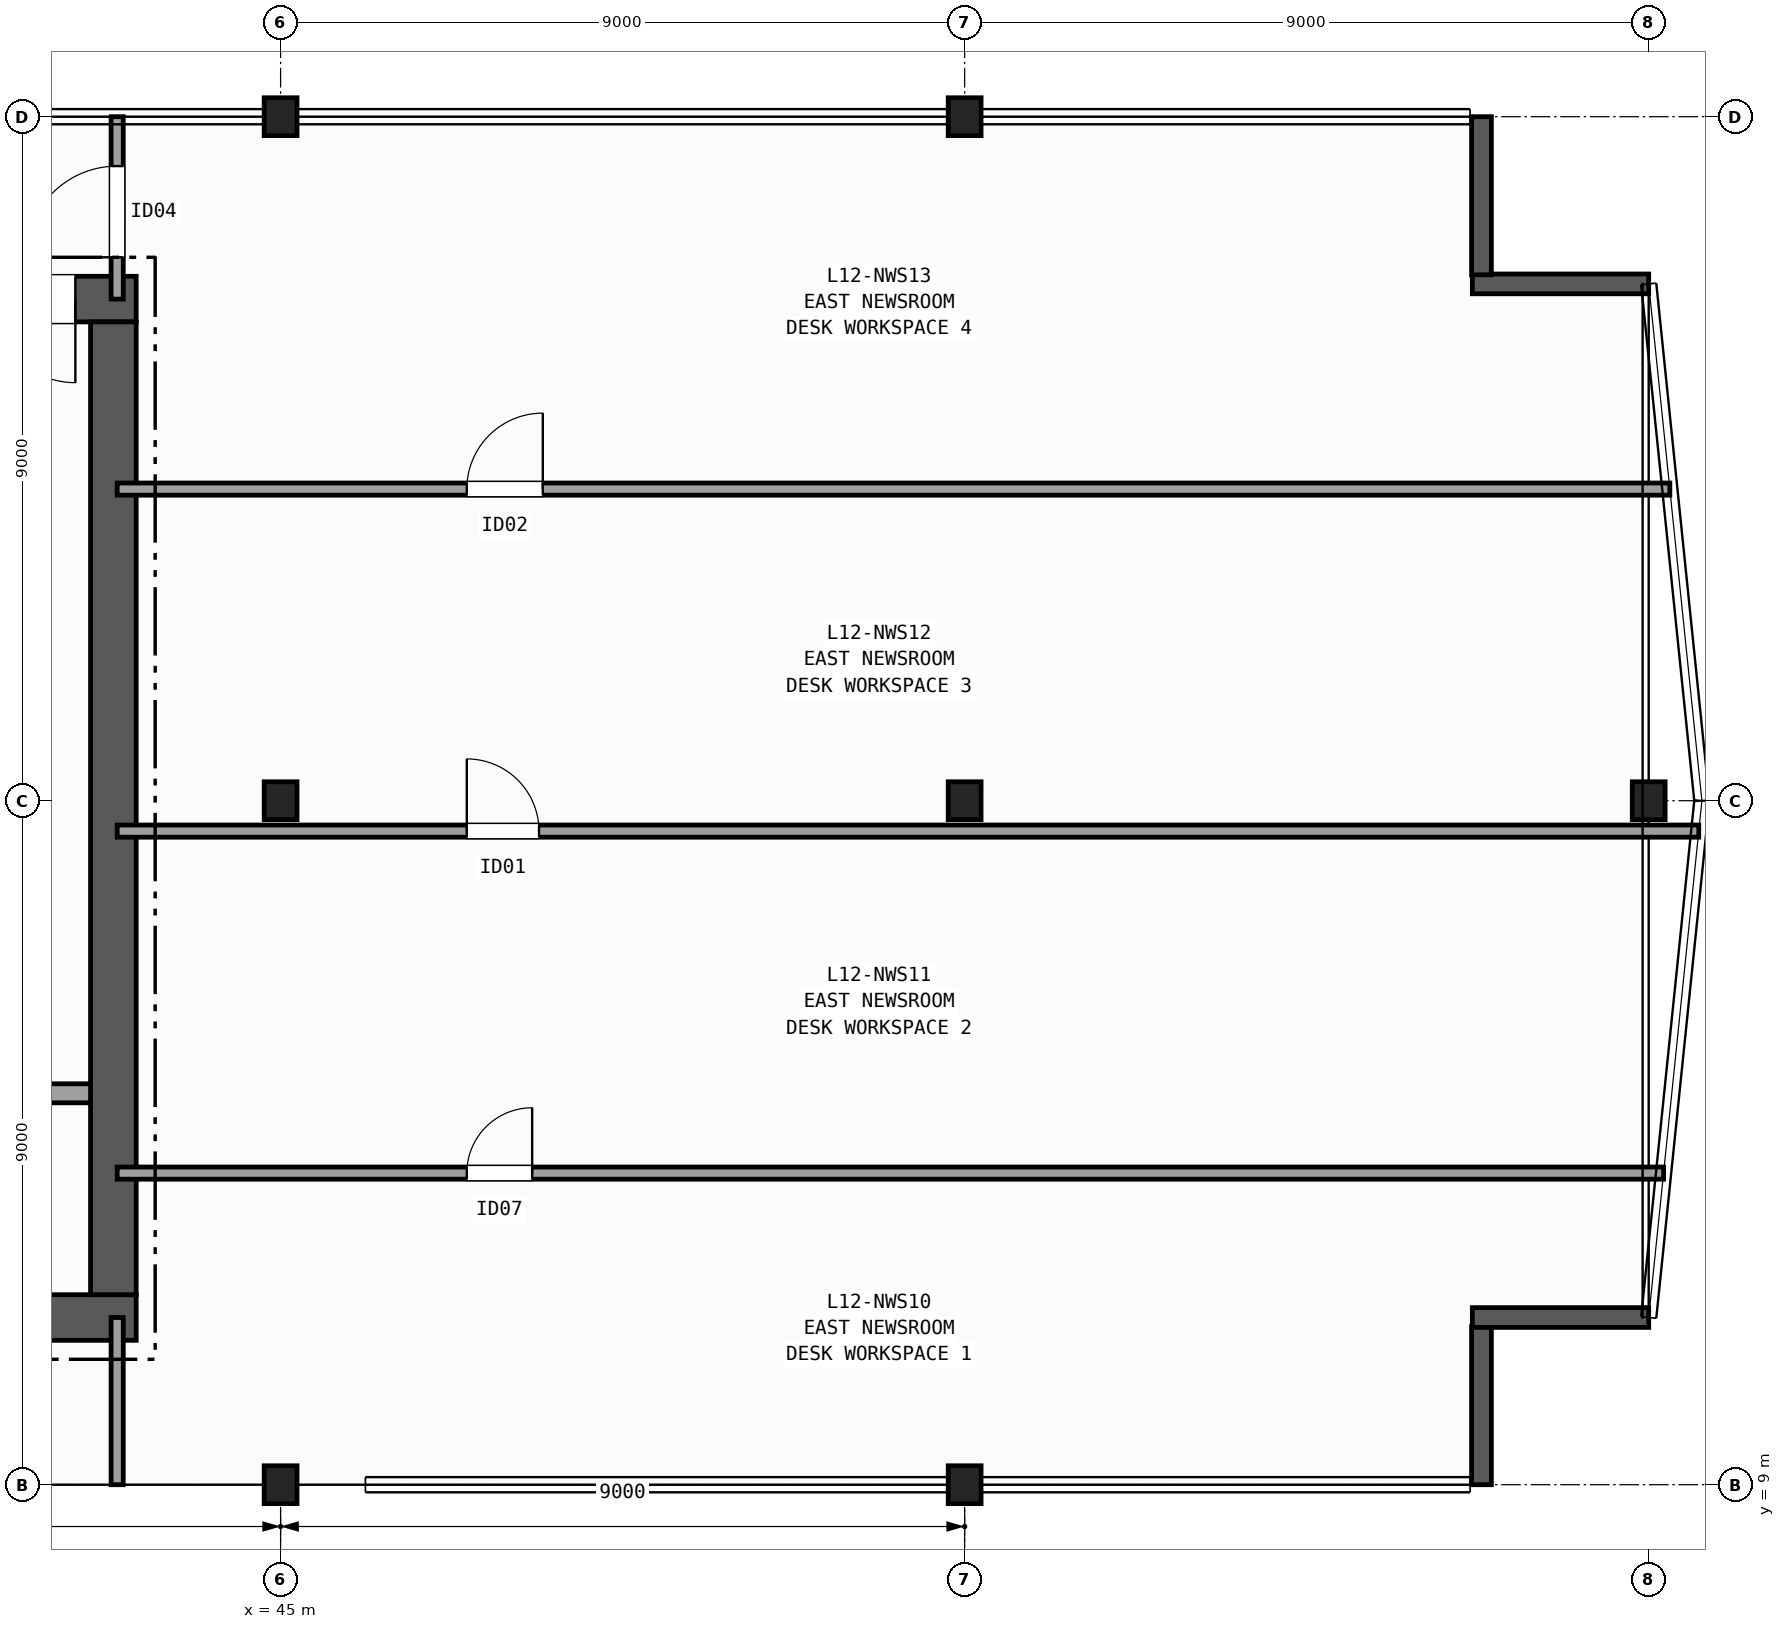
"""IFC4 building model, lengths in metres.
Left out: names, types, materials, properties, quantities, classifications, styles, units other than length and angle.
Written with IfcOpenShell. Run it as: python <this file> out.ifc"""

import sys

from ifc_helpers import new_model, si_unit, direction, frame, frame_2d, origin, origin_2d, place, context, subcontext, project, spatial, rectangle, i_section, extrude, element, fill, save


model = new_model("IFC4")
c1 = context("Model", 3, precision=1e-05, world=origin(), true_north=direction((0.0, 1.0)))
c2 = subcontext(c1, "Body", "Model", "MODEL_VIEW")
j1 = project(units=[si_unit("LENGTHUNIT", "METRE"), si_unit("PLANEANGLEUNIT", "RADIAN")], contexts=[c1])
p1 = place(None, origin())
s1 = spatial("IfcSite", under=j1, at=p1, CompositionType="ELEMENT")
p2 = place(p1, origin())
s2 = spatial("IfcBuilding", under=s1, at=p2, CompositionType="ELEMENT")
p3 = place(p2, frame((0.0, 0.0, 54.5)))
s3 = spatial("IfcBuildingStorey", under=s2, at=p3, CompositionType="ELEMENT", Elevation=54.5)
for number, where, z_axis, x_axis in (
    (1, (45.0, 9.0, 0.0), (0.0, 0.0, 1.0), (1.0, 0.0, 0.0)),
    (2, (45.0, 18.0, 0.0), (0.0, 0.0, 1.0), (1.0, 0.0, 0.0)),
    (3, (45.0, 27.0, 0.0), (0.0, 0.0, 1.0), (1.0, 0.0, 0.0)),
    (4, (54.0, 9.0, 0.0), (0.0, 0.0, 1.0), (1.0, 0.0, 0.0)),
    (5, (54.0, 18.0, 0.0), (0.0, 0.0, 1.0), (1.0, 0.0, 0.0)),
    (6, (54.0, 27.0, 0.0), (0.0, 0.0, 1.0), (1.0, 0.0, 0.0)),
    (7, (63.0, 18.0, 0.0), (0.0, 0.0, 1.0), (1.0, 0.0, 0.0)),
):
    element("IfcColumn", number, at=place(p3, frame(where, z_axis=z_axis, x_axis=x_axis)), inside=s3, PredefinedType="COLUMN", context=c2, shape_type="SweptSolid", body=[
        extrude(i_section(OverallWidth=0.432, OverallDepth=0.498, WebThickness=0.056, FlangeThickness=0.089, FilletRadius=0.015, at=origin_2d()), origin(), (0.0, 0.0, 1.0), 3.7),
    ])
p4 = place(p3, frame((60.8, 9.0, 0.0), z_axis=(0.0, 0.0, 1.0), x_axis=(0.0, 1.0, 0.0)))
e8 = element("IfcWall", 8, at=p4, inside=s3, PredefinedType="SOLIDWALL", context=c2, shape_type="SweptSolid", body=[
    extrude(rectangle(XDim=2.08, YDim=0.26, at=frame_2d((1.04, 0.0))), origin(), (0.0, 0.0, 1.0), 3.42),
])
for number, where, z_axis, x_axis in (
    (9, (60.68, 11.2, 0.0), (0.0, 0.0, 1.0), (1.0, 0.0, 0.0)),
    (10, (63.0, 24.8, 0.0), (0.0, 0.0, 1.0), (-1.0, 0.0, 0.0)),
):
    element("IfcWall", number, at=place(p3, frame(where, z_axis=z_axis, x_axis=x_axis)), inside=s3, PredefinedType="SOLIDWALL", context=c2, shape_type="SweptSolid", body=[
        extrude(rectangle(XDim=2.32, YDim=0.26, at=frame_2d((1.16, 0.0))), origin(), (0.0, 0.0, 1.0), 3.42),
    ])
p5 = place(p3, frame((60.8, 24.92, 0.0), z_axis=(0.0, 0.0, 1.0), x_axis=(0.0, 1.0, 0.0)))
e11 = element("IfcWall", 11, at=p5, inside=s3, PredefinedType="SOLIDWALL", context=c2, shape_type="SweptSolid", body=[
    extrude(rectangle(XDim=2.08, YDim=0.26, at=frame_2d((1.04, 0.0))), origin(), (0.0, 0.0, 1.0), 3.42),
])
p6 = place(p3, frame((29.1, 11.2, 0.0), z_axis=(0.0, 0.0, 1.0), x_axis=(1.0, 0.0, 0.0)))
e12 = element("IfcWall", 12, at=p6, inside=s3, PredefinedType="SHEAR", context=c2, shape_type="SweptSolid", body=[
    extrude(rectangle(XDim=14.0, YDim=0.6, at=frame_2d((7.0, 0.0))), origin(), (0.0, 0.0, 1.0), 3.42),
])
p7 = place(p3, frame((43.1, 24.6, 0.0), z_axis=(0.0, 0.0, 1.0), x_axis=(-1.0, 0.0, 0.0)))
e13 = element("IfcWall", 13, at=p7, inside=s3, PredefinedType="SHEAR", context=c2, shape_type="SweptSolid", body=[
    extrude(rectangle(XDim=14.0, YDim=0.6, at=frame_2d((7.0, 0.0))), origin(), (0.0, 0.0, 1.0), 3.42),
])
p8 = place(p7, frame((0.8, 0.0, 0.0)))
e14 = element("IfcOpeningElement", 14, at=p8, cuts=e13, PredefinedType="OPENING", context=c2, shape_type="SweptSolid", body=[
    extrude(rectangle(XDim=1.1, YDim=2.15, at=frame_2d((0.55, 1.075))), frame((0.0, 0.31, 0.0), z_axis=(0.0, -1.0, 0.0), x_axis=(1.0, 0.0, 0.0)), (0.0, 0.0, 1.0), 0.62),
])
p9 = place(p7, frame((2.3, 0.0, 0.0)))
e15 = element("IfcOpeningElement", 15, at=p9, cuts=e13, PredefinedType="OPENING", context=c2, shape_type="SweptSolid", body=[
    extrude(rectangle(XDim=0.9, YDim=2.1, at=frame_2d((0.45, 1.05))), frame((0.0, 0.31, 0.0), z_axis=(0.0, -1.0, 0.0), x_axis=(1.0, 0.0, 0.0)), (0.0, 0.0, 1.0), 0.62),
])
p10 = place(p7, frame((3.6, 0.0, 0.0)))
e16 = element("IfcOpeningElement", 16, at=p10, cuts=e13, PredefinedType="OPENING", context=c2, shape_type="SweptSolid", body=[
    extrude(rectangle(XDim=0.9, YDim=2.1, at=frame_2d((0.45, 1.05))), frame((0.0, 0.31, 0.0), z_axis=(0.0, -1.0, 0.0), x_axis=(1.0, 0.0, 0.0)), (0.0, 0.0, 1.0), 0.62),
])
p11 = place(p7, frame((4.95, 0.0, 0.0)))
e17 = element("IfcOpeningElement", 17, at=p11, cuts=e13, PredefinedType="OPENING", context=c2, shape_type="SweptSolid", body=[
    extrude(rectangle(XDim=0.9, YDim=2.1, at=frame_2d((0.45, 1.05))), frame((0.0, 0.31, 0.0), z_axis=(0.0, -1.0, 0.0), x_axis=(1.0, 0.0, 0.0)), (0.0, 0.0, 1.0), 0.62),
])
p12 = place(p3, frame((42.8, 11.5, 0.0), z_axis=(0.0, 0.0, 1.0), x_axis=(0.0, 1.0, 0.0)))
e18 = element("IfcWall", 18, at=p12, inside=s3, PredefinedType="SHEAR", context=c2, shape_type="SweptSolid", body=[
    extrude(rectangle(XDim=12.8, YDim=0.6, at=frame_2d((6.4, 0.0))), origin(), (0.0, 0.0, 1.0), 3.42),
])
p13 = place(p3, frame((33.07, 14.15, 0.0), z_axis=(0.0, 0.0, 1.0), x_axis=(1.0, 0.0, 0.0)))
e19 = element("IfcWall", 19, at=p13, inside=s3, PredefinedType="PARTITIONING", context=c2, shape_type="SweptSolid", body=[
    extrude(rectangle(XDim=9.43, YDim=0.25, at=frame_2d((4.715, 0.0))), origin(), (0.0, 0.0, 1.0), 3.42),
])
p14 = place(p13, frame((0.755, 0.0, 0.0)))
e20 = element("IfcOpeningElement", 20, at=p14, cuts=e19, PredefinedType="OPENING", context=c2, shape_type="SweptSolid", body=[
    extrude(rectangle(XDim=1.15, YDim=2.15, at=frame_2d((0.575, 1.075))), frame((0.0, 0.135, 0.0), z_axis=(0.0, -1.0, 0.0), x_axis=(1.0, 0.0, 0.0)), (0.0, 0.0, 1.0), 0.27),
])
p15 = place(p13, frame((3.355, 0.0, 0.0)))
e21 = element("IfcOpeningElement", 21, at=p15, cuts=e19, PredefinedType="OPENING", context=c2, shape_type="SweptSolid", body=[
    extrude(rectangle(XDim=1.15, YDim=2.15, at=frame_2d((0.575, 1.075))), frame((0.0, 0.135, 0.0), z_axis=(0.0, -1.0, 0.0), x_axis=(1.0, 0.0, 0.0)), (0.0, 0.0, 1.0), 0.27),
])
p16 = place(p3, frame((42.85, 9.0, 0.0), z_axis=(0.0, 0.0, 1.0), x_axis=(0.0, 1.0, 0.0)))
e22 = element("IfcWall", 22, at=p16, inside=s3, PredefinedType="PARTITIONING", context=c2, shape_type="SweptSolid", body=[
    extrude(rectangle(XDim=2.2, YDim=0.16, at=frame_2d((1.1, 0.0))), origin(), (0.0, 0.0, 1.0), 2.627),
])
p17 = place(p3, frame((42.85, 24.6, 0.0), z_axis=(0.0, 0.0, 1.0), x_axis=(0.0, 1.0, 0.0)))
e23 = element("IfcWall", 23, at=p17, inside=s3, PredefinedType="PARTITIONING", context=c2, shape_type="SweptSolid", body=[
    extrude(rectangle(XDim=2.4, YDim=0.16, at=frame_2d((1.2, 0.0))), origin(), (0.0, 0.0, 1.0), 2.627),
])
p18 = place(p17, frame((0.55, 0.0, 0.0)))
e24 = element("IfcOpeningElement", 24, at=p18, cuts=e23, PredefinedType="OPENING", context=c2, shape_type="SweptSolid", body=[
    extrude(rectangle(XDim=1.2, YDim=2.15, at=frame_2d((0.6, 1.075))), frame((0.0, 0.09, 0.0), z_axis=(0.0, -1.0, 0.0), x_axis=(1.0, 0.0, 0.0)), (0.0, 0.0, 1.0), 0.18),
])
p19 = place(p3, frame((42.85, 13.1, 0.0), z_axis=(0.0, 0.0, 1.0), x_axis=(1.0, 0.0, 0.0)))
e25 = element("IfcWall", 25, at=p19, inside=s3, PredefinedType="PARTITIONING", context=c2, shape_type="SweptSolid", body=[
    extrude(rectangle(XDim=20.346, YDim=0.16, at=frame_2d((10.173, 0.0))), origin(), (0.0, 0.0, 1.0), 3.42),
])
p20 = place(p19, frame((4.6, 0.0, 0.0)))
e26 = element("IfcOpeningElement", 26, at=p20, cuts=e25, PredefinedType="OPENING", context=c2, shape_type="SweptSolid", body=[
    extrude(rectangle(XDim=0.86, YDim=2.05, at=frame_2d((0.43, 1.025))), frame((0.0, 0.09, 0.0), z_axis=(0.0, -1.0, 0.0), x_axis=(1.0, 0.0, 0.0)), (0.0, 0.0, 1.0), 0.18),
])
p21 = place(p3, frame((42.85, 17.6, 0.0), z_axis=(0.0, 0.0, 1.0), x_axis=(1.0, 0.0, 0.0)))
e27 = element("IfcWall", 27, at=p21, inside=s3, PredefinedType="PARTITIONING", context=c2, shape_type="SweptSolid", body=[
    extrude(rectangle(XDim=20.809, YDim=0.16, at=frame_2d((10.404, 0.0))), origin(), (0.0, 0.0, 1.0), 3.42),
])
p22 = place(p21, frame((4.6, 0.0, 0.0)))
e28 = element("IfcOpeningElement", 28, at=p22, cuts=e27, PredefinedType="OPENING", context=c2, shape_type="SweptSolid", body=[
    extrude(rectangle(XDim=0.95, YDim=2.1, at=frame_2d((0.475, 1.05))), frame((0.0, 0.09, 0.0), z_axis=(0.0, -1.0, 0.0), x_axis=(1.0, 0.0, 0.0)), (0.0, 0.0, 1.0), 0.18),
])
p23 = place(p3, frame((42.85, 22.1, 0.0), z_axis=(0.0, 0.0, 1.0), x_axis=(1.0, 0.0, 0.0)))
e29 = element("IfcWall", 29, at=p23, inside=s3, PredefinedType="PARTITIONING", context=c2, shape_type="SweptSolid", body=[
    extrude(rectangle(XDim=20.428, YDim=0.16, at=frame_2d((10.214, 0.0))), origin(), (0.0, 0.0, 1.0), 3.42),
])
p24 = place(p23, frame((4.6, 0.0, 0.0)))
e30 = element("IfcOpeningElement", 30, at=p24, cuts=e29, PredefinedType="OPENING", context=c2, shape_type="SweptSolid", body=[
    extrude(rectangle(XDim=1.0, YDim=2.1, at=frame_2d((0.5, 1.05))), frame((0.0, 0.09, 0.0), z_axis=(0.0, -1.0, 0.0), x_axis=(1.0, 0.0, 0.0)), (0.0, 0.0, 1.0), 0.18),
])
p25 = place(p8, origin())
e31 = element("IfcDoor", 31, at=p25, inside=s3, OperationType="SINGLE_SWING_LEFT", PredefinedType="DOOR", context=c2, shape_type="SweptSolid", body=[
    extrude(rectangle(XDim=1.1, YDim=2.15, at=frame_2d((0.55, 1.075))), frame((0.0, 0.025, 0.0), z_axis=(0.0, -1.0, 0.0), x_axis=(1.0, 0.0, 0.0)), (0.0, 0.0, 1.0), 0.05),
])
fill(e14, e31)
p26 = place(p18, origin())
e32 = element("IfcDoor", 32, at=p26, inside=s3, OperationType="SINGLE_SWING_LEFT", PredefinedType="DOOR", context=c2, shape_type="SweptSolid", body=[
    extrude(rectangle(XDim=1.2, YDim=2.15, at=frame_2d((0.6, 1.075))), frame((0.0, 0.025, 0.0), z_axis=(0.0, -1.0, 0.0), x_axis=(1.0, 0.0, 0.0)), (0.0, 0.0, 1.0), 0.05),
])
fill(e24, e32)
p27 = place(p20, origin())
e33 = element("IfcDoor", 33, at=p27, inside=s3, OperationType="SINGLE_SWING_RIGHT", PredefinedType="DOOR", context=c2, shape_type="SweptSolid", body=[
    extrude(rectangle(XDim=0.86, YDim=2.05, at=frame_2d((0.43, 1.025))), frame((0.0, 0.025, 0.0), z_axis=(0.0, -1.0, 0.0), x_axis=(1.0, 0.0, 0.0)), (0.0, 0.0, 1.0), 0.05),
])
fill(e26, e33)
p28 = place(p22, origin())
e34 = element("IfcDoor", 34, at=p28, inside=s3, OperationType="SINGLE_SWING_LEFT", PredefinedType="DOOR", context=c2, shape_type="SweptSolid", body=[
    extrude(rectangle(XDim=0.95, YDim=2.1, at=frame_2d((0.475, 1.05))), frame((0.0, 0.025, 0.0), z_axis=(0.0, -1.0, 0.0), x_axis=(1.0, 0.0, 0.0)), (0.0, 0.0, 1.0), 0.05),
])
fill(e28, e34)
p29 = place(p24, origin())
e35 = element("IfcDoor", 35, at=p29, inside=s3, OperationType="SINGLE_SWING_RIGHT", PredefinedType="DOOR", context=c2, shape_type="SweptSolid", body=[
    extrude(rectangle(XDim=1.0, YDim=2.1, at=frame_2d((0.5, 1.05))), frame((0.0, 0.025, 0.0), z_axis=(0.0, -1.0, 0.0), x_axis=(1.0, 0.0, 0.0)), (0.0, 0.0, 1.0), 0.05),
])
fill(e30, e35)
save(model, sys.argv[1])
